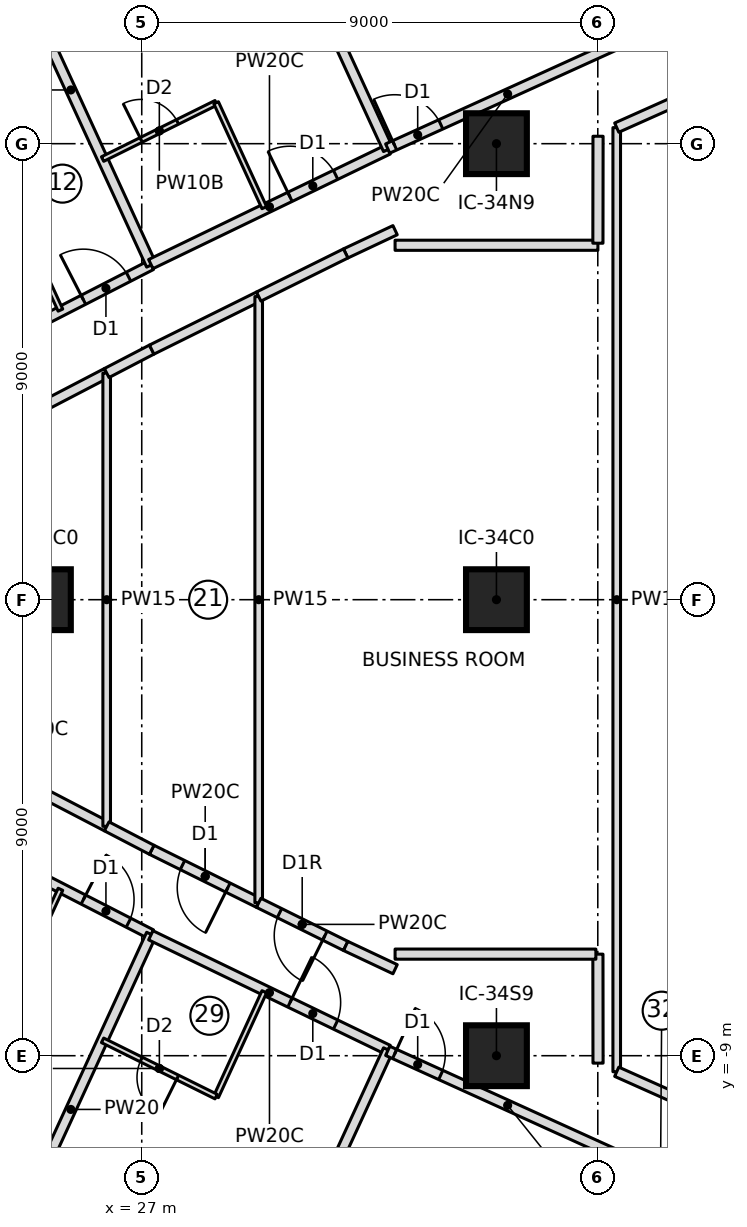
"""IFC4 building model, lengths in metres.
Left out: names, types, materials, properties, quantities, classifications, styles, units other than length and angle.
Written with IfcOpenShell. Run it as: python <this file> out.ifc"""

import sys

from ifc_helpers import new_model, si_unit, direction, frame, frame_2d, origin, origin_2d, place, context, subcontext, project, spatial, rectangle, extrude, element, fill, save


model = new_model("IFC4")
c1 = context("Model", 3, precision=1e-05, world=origin(), true_north=direction((0.0, 1.0)))
c2 = subcontext(c1, "Body", "Model", "MODEL_VIEW")
j1 = project(units=[si_unit("LENGTHUNIT", "METRE"), si_unit("PLANEANGLEUNIT", "RADIAN")], contexts=[c1])
p1 = place(None, origin())
s1 = spatial("IfcSite", under=j1, at=p1, CompositionType="ELEMENT")
p2 = place(p1, origin())
s2 = spatial("IfcBuilding", under=s1, at=p2, CompositionType="ELEMENT")
p3 = place(p2, frame((0.0, 0.0, 116.85)))
s3 = spatial("IfcBuildingStorey", under=s2, at=p3, CompositionType="ELEMENT", Elevation=116.85)
for number, where, z_axis, x_axis in (
    (1, (25.0, 0.0, 0.0), (0.0, 0.0, 1.0), (1.0, 0.0, 0.0)),
    (2, (34.0, -9.0, 0.0), (0.0, 0.0, 1.0), (1.0, 0.0, 0.0)),
    (3, (34.0, 0.0, 0.0), (0.0, 0.0, 1.0), (1.0, 0.0, 0.0)),
    (4, (34.0, 9.0, 0.0), (0.0, 0.0, 1.0), (1.0, 0.0, 0.0)),
):
    element("IfcColumn", number, at=place(p3, frame(where, z_axis=z_axis, x_axis=x_axis)), inside=s3, PredefinedType="COLUMN", context=c2, shape_type="SweptSolid", body=[
        extrude(rectangle(XDim=1.2, YDim=1.2, at=origin_2d()), origin(), (0.0, 0.0, 1.0), 3.55),
    ])
p4 = place(p3, frame((22.557, 4.229, 0.0), z_axis=(0.0, 0.0, 1.0), x_axis=(0.889706581948, 0.456532800617, 0.0)))
e5 = element("IfcWall", 5, at=p4, inside=s3, PredefinedType="PARTITIONING", context=c2, shape_type="SweptSolid", body=[
    extrude(rectangle(XDim=5.205, YDim=0.2, at=frame_2d((2.603, 0.0))), origin(), (0.0, 0.0, 1.0), 3.15),
])
p5 = place(p4, frame((3.7, 0.0, 0.0)))
e6 = element("IfcOpeningElement", 6, at=p5, cuts=e5, PredefinedType="OPENING", context=c2, shape_type="SweptSolid", body=[
    extrude(rectangle(XDim=1.0, YDim=2.1, at=frame_2d((0.5, 1.05))), frame((0.0, 0.11, 0.0), z_axis=(0.0, -1.0, 0.0), x_axis=(1.0, 0.0, 0.0)), (0.0, 0.0, 1.0), 0.22),
])
p6 = place(p3, frame((24.235, 8.242, 0.0), z_axis=(0.0, 0.0, 1.0), x_axis=(0.417359077977, -0.908741657475, 0.0)))
e7 = element("IfcWall", 7, at=p6, inside=s3, PredefinedType="PARTITIONING", context=c2, shape_type="SweptSolid", body=[
    extrude(rectangle(XDim=2.78, YDim=0.1, at=frame_2d((1.39, 0.0))), origin(), (0.0, 0.0, 1.0), 3.15),
])
p7 = place(p3, frame((27.188, 6.606, 0.0), z_axis=(0.0, 0.0, 1.0), x_axis=(-0.417428513692, 0.908709764422, 0.0)))
e8 = element("IfcWall", 8, at=p7, inside=s3, PredefinedType="PARTITIONING", context=c2, shape_type="SweptSolid", body=[
    extrude(rectangle(XDim=7.603, YDim=0.2, at=frame_2d((3.802, 0.0))), origin(), (0.0, 0.0, 1.0), 3.15),
])
p8 = place(p3, frame((27.179, 6.624, 0.0), z_axis=(0.0, 0.0, 1.0), x_axis=(0.900446408639, 0.434966970204, 0.0)))
e9 = element("IfcWall", 9, at=p8, inside=s3, PredefinedType="PARTITIONING", context=c2, shape_type="SweptSolid", body=[
    extrude(rectangle(XDim=5.201, YDim=0.2, at=frame_2d((2.601, 0.0))), origin(), (0.0, 0.0, 1.0), 3.15),
])
p9 = place(p8, frame((3.05, 0.0, 0.0)))
e10 = element("IfcOpeningElement", 10, at=p9, cuts=e9, PredefinedType="OPENING", context=c2, shape_type="SweptSolid", body=[
    extrude(rectangle(XDim=1.0, YDim=2.1, at=frame_2d((0.5, 1.05))), frame((0.0, 0.11, 0.0), z_axis=(0.0, -1.0, 0.0), x_axis=(1.0, 0.0, 0.0)), (0.0, 0.0, 1.0), 0.22),
])
p10 = place(p3, frame((26.227, 8.697, 0.0), z_axis=(0.0, 0.0, 1.0), x_axis=(0.895944857815, 0.444165297784, 0.0)))
e11 = element("IfcWall", 11, at=p10, inside=s3, PredefinedType="PARTITIONING", context=c2, shape_type="SweptSolid", body=[
    extrude(rectangle(XDim=2.501, YDim=0.1, at=frame_2d((1.25, 0.0))), origin(), (0.0, 0.0, 1.0), 3.15),
])
p11 = place(p10, frame((0.85, 0.0, 0.0)))
e12 = element("IfcOpeningElement", 12, at=p11, cuts=e11, PredefinedType="OPENING", context=c2, shape_type="SweptSolid", body=[
    extrude(rectangle(XDim=0.8, YDim=2.1, at=frame_2d((0.4, 1.05))), frame((0.0, 0.06, 0.0), z_axis=(0.0, -1.0, 0.0), x_axis=(1.0, 0.0, 0.0)), (0.0, 0.0, 1.0), 0.12),
])
p12 = place(p3, frame((28.468, 9.807, 0.0), z_axis=(0.0, 0.0, 1.0), x_axis=(0.417344701557, -0.908748260016, 0.0)))
e13 = element("IfcWall", 13, at=p12, inside=s3, PredefinedType="PARTITIONING", context=c2, shape_type="SweptSolid", body=[
    extrude(rectangle(XDim=2.278, YDim=0.1, at=frame_2d((1.139, 0.0))), origin(), (0.0, 0.0, 1.0), 3.15),
])
p13 = place(p3, frame((31.862, 8.886, 0.0), z_axis=(0.0, 0.0, 1.0), x_axis=(-0.417429919618, 0.90870911859, 0.0)))
e14 = element("IfcWall", 14, at=p13, inside=s3, PredefinedType="PARTITIONING", context=c2, shape_type="SweptSolid", body=[
    extrude(rectangle(XDim=7.6, YDim=0.2, at=frame_2d((3.8, 0.0))), origin(), (0.0, 0.0, 1.0), 3.15),
])
p14 = place(p3, frame((31.854, 8.904, 0.0), z_axis=(0.0, 0.0, 1.0), x_axis=(0.910421138148, 0.413682669704, 0.0)))
e15 = element("IfcWall", 15, at=p14, inside=s3, PredefinedType="PARTITIONING", context=c2, shape_type="SweptSolid", body=[
    extrude(rectangle(XDim=5.2, YDim=0.2, at=frame_2d((2.6, 0.0))), origin(), (0.0, 0.0, 1.0), 3.15),
])
p15 = place(p14, frame((0.15, 0.0, 0.0)))
e16 = element("IfcOpeningElement", 16, at=p15, cuts=e15, PredefinedType="OPENING", context=c2, shape_type="SweptSolid", body=[
    extrude(rectangle(XDim=1.0, YDim=2.1, at=frame_2d((0.5, 1.05))), frame((0.0, 0.11, 0.0), z_axis=(0.0, -1.0, 0.0), x_axis=(1.0, 0.0, 0.0)), (0.0, 0.0, 1.0), 0.22),
])
p16 = place(p3, frame((22.557, -4.229, 0.0), z_axis=(0.0, 0.0, 1.0), x_axis=(0.889706581948, -0.456532800617, 0.0)))
e17 = element("IfcWall", 17, at=p16, inside=s3, PredefinedType="PARTITIONING", context=c2, shape_type="SweptSolid", body=[
    extrude(rectangle(XDim=5.205, YDim=0.2, at=frame_2d((2.603, 0.0))), origin(), (0.0, 0.0, 1.0), 3.15),
])
p17 = place(p16, frame((3.7, 0.0, 0.0)))
e18 = element("IfcOpeningElement", 18, at=p17, cuts=e17, PredefinedType="OPENING", context=c2, shape_type="SweptSolid", body=[
    extrude(rectangle(XDim=1.0, YDim=2.1, at=frame_2d((0.5, 1.05))), frame((0.0, 0.11, 0.0), z_axis=(0.0, -1.0, 0.0), x_axis=(1.0, 0.0, 0.0)), (0.0, 0.0, 1.0), 0.22),
])
p18 = place(p3, frame((25.396, -5.715, 0.0), z_axis=(0.0, 0.0, 1.0), x_axis=(-0.417359077977, -0.908741657475, 0.0)))
e19 = element("IfcWall", 19, at=p18, inside=s3, PredefinedType="PARTITIONING", context=c2, shape_type="SweptSolid", body=[
    extrude(rectangle(XDim=2.78, YDim=0.1, at=frame_2d((1.39, 0.0))), origin(), (0.0, 0.0, 1.0), 3.15),
])
p19 = place(p3, frame((24.014, -13.515, 0.0), z_axis=(0.0, 0.0, 1.0), x_axis=(0.417428513692, 0.908709764422, 0.0)))
e20 = element("IfcWall", 20, at=p19, inside=s3, PredefinedType="PARTITIONING", context=c2, shape_type="SweptSolid", body=[
    extrude(rectangle(XDim=7.603, YDim=0.2, at=frame_2d((3.802, 0.0))), origin(), (0.0, 0.0, 1.0), 3.15),
])
p20 = place(p3, frame((27.179, -6.624, 0.0), z_axis=(0.0, 0.0, 1.0), x_axis=(0.900446408639, -0.434966970204, 0.0)))
e21 = element("IfcWall", 21, at=p20, inside=s3, PredefinedType="PARTITIONING", context=c2, shape_type="SweptSolid", body=[
    extrude(rectangle(XDim=5.201, YDim=0.2, at=frame_2d((2.601, 0.0))), origin(), (0.0, 0.0, 1.0), 3.15),
])
p21 = place(p20, frame((3.05, 0.0, 0.0)))
e22 = element("IfcOpeningElement", 22, at=p21, cuts=e21, PredefinedType="OPENING", context=c2, shape_type="SweptSolid", body=[
    extrude(rectangle(XDim=1.0, YDim=2.1, at=frame_2d((0.5, 1.05))), frame((0.0, 0.11, 0.0), z_axis=(0.0, -1.0, 0.0), x_axis=(1.0, 0.0, 0.0)), (0.0, 0.0, 1.0), 0.22),
])
p22 = place(p3, frame((29.419, -7.737, 0.0), z_axis=(0.0, 0.0, 1.0), x_axis=(-0.417344701557, -0.908748260016, 0.0)))
e23 = element("IfcWall", 23, at=p22, inside=s3, PredefinedType="PARTITIONING", context=c2, shape_type="SweptSolid", body=[
    extrude(rectangle(XDim=2.278, YDim=0.1, at=frame_2d((1.139, 0.0))), origin(), (0.0, 0.0, 1.0), 3.15),
])
p23 = place(p3, frame((28.468, -9.807, 0.0), z_axis=(0.0, 0.0, 1.0), x_axis=(-0.895944857815, 0.444165297784, 0.0)))
e24 = element("IfcWall", 24, at=p23, inside=s3, PredefinedType="PARTITIONING", context=c2, shape_type="SweptSolid", body=[
    extrude(rectangle(XDim=2.501, YDim=0.1, at=frame_2d((1.25, 0.0))), origin(), (0.0, 0.0, 1.0), 3.15),
])
p24 = place(p23, frame((0.85, 0.0, 0.0)))
e25 = element("IfcOpeningElement", 25, at=p24, cuts=e24, PredefinedType="OPENING", context=c2, shape_type="SweptSolid", body=[
    extrude(rectangle(XDim=0.8, YDim=2.1, at=frame_2d((0.4, 1.05))), frame((0.0, 0.06, 0.0), z_axis=(0.0, -1.0, 0.0), x_axis=(1.0, 0.0, 0.0)), (0.0, 0.0, 1.0), 0.12),
])
p25 = place(p3, frame((28.69, -15.792, 0.0), z_axis=(0.0, 0.0, 1.0), x_axis=(0.417429919618, 0.90870911859, 0.0)))
e26 = element("IfcWall", 26, at=p25, inside=s3, PredefinedType="PARTITIONING", context=c2, shape_type="SweptSolid", body=[
    extrude(rectangle(XDim=7.6, YDim=0.2, at=frame_2d((3.8, 0.0))), origin(), (0.0, 0.0, 1.0), 3.15),
])
p26 = place(p3, frame((31.854, -8.904, 0.0), z_axis=(0.0, 0.0, 1.0), x_axis=(0.910421138148, -0.413682669704, 0.0)))
e27 = element("IfcWall", 27, at=p26, inside=s3, PredefinedType="PARTITIONING", context=c2, shape_type="SweptSolid", body=[
    extrude(rectangle(XDim=5.2, YDim=0.2, at=frame_2d((2.6, 0.0))), origin(), (0.0, 0.0, 1.0), 3.15),
])
p27 = place(p26, frame((0.15, 0.0, 0.0)))
e28 = element("IfcOpeningElement", 28, at=p27, cuts=e27, PredefinedType="OPENING", context=c2, shape_type="SweptSolid", body=[
    extrude(rectangle(XDim=1.0, YDim=2.1, at=frame_2d((0.5, 1.05))), frame((0.0, 0.11, 0.0), z_axis=(0.0, -1.0, 0.0), x_axis=(1.0, 0.0, 0.0)), (0.0, 0.0, 1.0), 0.22),
])
for number, where, z_axis, x_axis in (
    (29, (23.407, 2.962, 0.0), (0.0, 0.0, 1.0), (0.887, 0.462, 0.0)),
    (30, (26.308, -4.473, 0.0), (0.0, 0.0, 1.0), (-0.887, 0.462, 0.0)),
):
    element("IfcWall", number, at=place(p3, frame(where, z_axis=z_axis, x_axis=x_axis)), inside=s3, PredefinedType="PARTITIONING", context=c2, shape_type="SweptSolid", body=[
        extrude(rectangle(XDim=3.271, YDim=0.2, at=frame_2d((1.636, 0.0))), origin(), (0.0, 0.0, 1.0), 3.15),
    ])
p28 = place(p3, frame((26.308, -4.473, 0.0), z_axis=(0.0, 0.0, 1.0), x_axis=(0.0, 1.0, 0.0)))
e31 = element("IfcWall", 31, at=p28, inside=s3, PredefinedType="PARTITIONING", context=c2, shape_type="SweptSolid", body=[
    extrude(rectangle(XDim=8.946, YDim=0.15, at=frame_2d((4.473, 0.0))), origin(), (0.0, 0.0, 1.0), 3.15),
])
p29 = place(p3, frame((29.308, -5.983, 0.0), z_axis=(0.0, 0.0, 1.0), x_axis=(-0.895954899574, 0.444145041546, 0.0)))
e32 = element("IfcWall", 32, at=p29, inside=s3, PredefinedType="PARTITIONING", context=c2, shape_type="SweptSolid", body=[
    extrude(rectangle(XDim=2.357, YDim=0.2, at=frame_2d((1.179, 0.0))), origin(), (0.0, 0.0, 1.0), 3.15),
])
p30 = place(p29, frame((0.678, 0.0, 0.0)))
e33 = element("IfcOpeningElement", 33, at=p30, cuts=e32, PredefinedType="OPENING", context=c2, shape_type="SweptSolid", body=[
    extrude(rectangle(XDim=1.0, YDim=2.1, at=frame_2d((0.5, 1.05))), frame((0.0, 0.11, 0.0), z_axis=(0.0, -1.0, 0.0), x_axis=(1.0, 0.0, 0.0)), (0.0, 0.0, 1.0), 0.22),
])
for number, where, z_axis, x_axis in (
    (34, (27.196, -4.936, 0.0), (0.0, 0.0, 1.0), (-0.887, 0.462, 0.0)),
    (35, (26.308, 4.473, 0.0), (0.0, 0.0, 1.0), (0.887, 0.462, 0.0)),
):
    element("IfcWall", number, at=place(p3, frame(where, z_axis=z_axis, x_axis=x_axis)), inside=s3, PredefinedType="PARTITIONING", context=c2, shape_type="SweptSolid", body=[
        extrude(rectangle(XDim=1.001, YDim=0.2, at=frame_2d((0.501, 0.0))), origin(), (0.0, 0.0, 1.0), 3.15),
    ])
p31 = place(p3, frame((27.196, 4.936, 0.0), z_axis=(0.0, 0.0, 1.0), x_axis=(0.895954899574, 0.444145041546, 0.0)))
e36 = element("IfcWall", 36, at=p31, inside=s3, PredefinedType="PARTITIONING", context=c2, shape_type="SweptSolid", body=[
    extrude(rectangle(XDim=2.357, YDim=0.2, at=frame_2d((1.179, 0.0))), origin(), (0.0, 0.0, 1.0), 3.15),
])
p32 = place(p3, frame((29.308, -5.983, 0.0), z_axis=(0.0, 0.0, 1.0), x_axis=(0.0, 1.0, 0.0)))
e37 = element("IfcWall", 37, at=p32, inside=s3, PredefinedType="PARTITIONING", context=c2, shape_type="SweptSolid", body=[
    extrude(rectangle(XDim=11.965, YDim=0.15, at=frame_2d((5.983, 0.0))), origin(), (0.0, 0.0, 1.0), 3.15),
])
p33 = place(p3, frame((31.025, -6.833, 0.0), z_axis=(0.0, 0.0, 1.0), x_axis=(-0.896001589052, 0.444050844404, 0.0)))
e38 = element("IfcWall", 38, at=p33, inside=s3, PredefinedType="PARTITIONING", context=c2, shape_type="SweptSolid", body=[
    extrude(rectangle(XDim=1.916, YDim=0.2, at=frame_2d((0.958, 0.0))), origin(), (0.0, 0.0, 1.0), 3.15),
])
p34 = place(p33, frame((0.458, 0.0, 0.0)))
e39 = element("IfcOpeningElement", 39, at=p34, cuts=e38, PredefinedType="OPENING", context=c2, shape_type="SweptSolid", body=[
    extrude(rectangle(XDim=1.0, YDim=2.1, at=frame_2d((0.5, 1.05))), frame((0.0, 0.11, 0.0), z_axis=(0.0, -1.0, 0.0), x_axis=(1.0, 0.0, 0.0)), (0.0, 0.0, 1.0), 0.22),
])
for number, where, z_axis, x_axis in (
    (40, (31.025, 6.833, 0.0), (0.0, 0.0, 1.0), (0.905, 0.426, 0.0)),
    (41, (32.0, -7.293, 0.0), (0.0, 0.0, 1.0), (-0.905, 0.426, 0.0)),
):
    element("IfcWall", number, at=place(p3, frame(where, z_axis=z_axis, x_axis=x_axis)), inside=s3, PredefinedType="PARTITIONING", context=c2, shape_type="SweptSolid", body=[
        extrude(rectangle(XDim=1.078, YDim=0.2, at=frame_2d((0.539, 0.0))), origin(), (0.0, 0.0, 1.0), 3.15),
    ])
p35 = place(p3, frame((29.308, 5.983, 0.0), z_axis=(0.0, 0.0, 1.0), x_axis=(0.896001589052, 0.444050844404, 0.0)))
e42 = element("IfcWall", 42, at=p35, inside=s3, PredefinedType="PARTITIONING", context=c2, shape_type="SweptSolid", body=[
    extrude(rectangle(XDim=1.916, YDim=0.2, at=frame_2d((0.958, 0.0))), origin(), (0.0, 0.0, 1.0), 3.15),
])
p36 = place(p3, frame((36.374, -9.317, 0.0), z_axis=(0.0, 0.0, 1.0), x_axis=(0.0, 1.0, 0.0)))
e43 = element("IfcWall", 43, at=p36, inside=s3, PredefinedType="PARTITIONING", context=c2, shape_type="SweptSolid", body=[
    extrude(rectangle(XDim=18.634, YDim=0.15, at=frame_2d((9.317, 0.0))), origin(), (0.0, 0.0, 1.0), 3.15),
])
for number, where, z_axis, x_axis in (
    (44, (38.792, -10.397, 0.0), (0.0, 0.0, 1.0), (-0.913, 0.408, 0.0)),
    (45, (36.374, 9.317, 0.0), (0.0, 0.0, 1.0), (0.913, 0.408, 0.0)),
):
    element("IfcWall", number, at=place(p3, frame(where, z_axis=z_axis, x_axis=x_axis)), inside=s3, PredefinedType="PARTITIONING", context=c2, shape_type="SweptSolid", body=[
        extrude(rectangle(XDim=2.648, YDim=0.2, at=frame_2d((1.324, 0.0))), origin(), (0.0, 0.0, 1.0), 3.15),
    ])
p37 = place(p3, frame((36.005, -9.146, 0.0), z_axis=(0.0, 0.0, 1.0), x_axis=(-0.001135073049, 0.999999355804, 0.0)))
e46 = element("IfcWall", 46, at=p37, inside=s3, PredefinedType="PARTITIONING", context=c2, shape_type="SweptSolid", body=[
    extrude(rectangle(XDim=2.151, YDim=0.2, at=frame_2d((1.075, 0.0))), origin(), (0.0, 0.0, 1.0), 3.15),
])
p38 = place(p3, frame((35.962, -6.996, 0.0), z_axis=(0.0, 0.0, 1.0), x_axis=(-0.999999992409, 0.000123213405, 0.0)))
e47 = element("IfcWall", 47, at=p38, inside=s3, PredefinedType="PARTITIONING", context=c2, shape_type="SweptSolid", body=[
    extrude(rectangle(XDim=3.963, YDim=0.2, at=frame_2d((1.981, 0.0))), origin(), (0.0, 0.0, 1.0), 3.15),
])
p39 = place(p3, frame((32.0, 6.995, 0.0), z_axis=(0.0, 0.0, 1.0), x_axis=(0.99999999256, 0.00012198097, 0.0)))
e48 = element("IfcWall", 48, at=p39, inside=s3, PredefinedType="PARTITIONING", context=c2, shape_type="SweptSolid", body=[
    extrude(rectangle(XDim=4.003, YDim=0.2, at=frame_2d((2.001, 0.0))), origin(), (0.0, 0.0, 1.0), 3.15),
])
p40 = place(p3, frame((36.002, 7.036, 0.0), z_axis=(0.0, 0.0, 1.0), x_axis=(0.001156603436, 0.999999331134, 0.0)))
e49 = element("IfcWall", 49, at=p40, inside=s3, PredefinedType="PARTITIONING", context=c2, shape_type="SweptSolid", body=[
    extrude(rectangle(XDim=2.111, YDim=0.2, at=frame_2d((1.055, 0.0))), origin(), (0.0, 0.0, 1.0), 3.15),
])
p41 = place(p5, origin())
e50 = element("IfcDoor", 50, at=p41, inside=s3, OperationType="SINGLE_SWING_LEFT", PredefinedType="DOOR", context=c2, shape_type="SweptSolid", body=[
    extrude(rectangle(XDim=1.0, YDim=2.1, at=frame_2d((0.5, 1.05))), frame((0.0, 0.025, 0.0), z_axis=(0.0, -1.0, 0.0), x_axis=(1.0, 0.0, 0.0)), (0.0, 0.0, 1.0), 0.05),
])
fill(e6, e50)
p42 = place(p11, origin())
e51 = element("IfcDoor", 51, at=p42, inside=s3, OperationType="SINGLE_SWING_LEFT", PredefinedType="DOOR", context=c2, shape_type="SweptSolid", body=[
    extrude(rectangle(XDim=0.8, YDim=2.1, at=frame_2d((0.4, 1.05))), frame((0.0, 0.025, 0.0), z_axis=(0.0, -1.0, 0.0), x_axis=(1.0, 0.0, 0.0)), (0.0, 0.0, 1.0), 0.05),
])
fill(e12, e51)
p43 = place(p9, origin())
e52 = element("IfcDoor", 52, at=p43, inside=s3, OperationType="SINGLE_SWING_LEFT", PredefinedType="DOOR", context=c2, shape_type="SweptSolid", body=[
    extrude(rectangle(XDim=1.0, YDim=2.1, at=frame_2d((0.5, 1.05))), frame((0.0, 0.025, 0.0), z_axis=(0.0, -1.0, 0.0), x_axis=(1.0, 0.0, 0.0)), (0.0, 0.0, 1.0), 0.05),
])
fill(e10, e52)
p44 = place(p15, origin())
e53 = element("IfcDoor", 53, at=p44, inside=s3, OperationType="SINGLE_SWING_LEFT", PredefinedType="DOOR", context=c2, shape_type="SweptSolid", body=[
    extrude(rectangle(XDim=1.0, YDim=2.1, at=frame_2d((0.5, 1.05))), frame((0.0, 0.025, 0.0), z_axis=(0.0, -1.0, 0.0), x_axis=(1.0, 0.0, 0.0)), (0.0, 0.0, 1.0), 0.05),
])
fill(e16, e53)
p45 = place(p17, origin())
e54 = element("IfcDoor", 54, at=p45, inside=s3, OperationType="SINGLE_SWING_LEFT", PredefinedType="DOOR", context=c2, shape_type="SweptSolid", body=[
    extrude(rectangle(XDim=1.0, YDim=2.1, at=frame_2d((0.5, 1.05))), frame((0.0, 0.025, 0.0), z_axis=(0.0, -1.0, 0.0), x_axis=(1.0, 0.0, 0.0)), (0.0, 0.0, 1.0), 0.05),
])
fill(e18, e54)
p46 = place(p24, origin())
e55 = element("IfcDoor", 55, at=p46, inside=s3, OperationType="SINGLE_SWING_LEFT", PredefinedType="DOOR", context=c2, shape_type="SweptSolid", body=[
    extrude(rectangle(XDim=0.8, YDim=2.1, at=frame_2d((0.4, 1.05))), frame((0.0, 0.025, 0.0), z_axis=(0.0, -1.0, 0.0), x_axis=(1.0, 0.0, 0.0)), (0.0, 0.0, 1.0), 0.05),
])
fill(e25, e55)
p47 = place(p21, origin())
e56 = element("IfcDoor", 56, at=p47, inside=s3, OperationType="SINGLE_SWING_LEFT", PredefinedType="DOOR", context=c2, shape_type="SweptSolid", body=[
    extrude(rectangle(XDim=1.0, YDim=2.1, at=frame_2d((0.5, 1.05))), frame((0.0, 0.025, 0.0), z_axis=(0.0, -1.0, 0.0), x_axis=(1.0, 0.0, 0.0)), (0.0, 0.0, 1.0), 0.05),
])
fill(e22, e56)
p48 = place(p27, origin())
e57 = element("IfcDoor", 57, at=p48, inside=s3, OperationType="SINGLE_SWING_LEFT", PredefinedType="DOOR", context=c2, shape_type="SweptSolid", body=[
    extrude(rectangle(XDim=1.0, YDim=2.1, at=frame_2d((0.5, 1.05))), frame((0.0, 0.025, 0.0), z_axis=(0.0, -1.0, 0.0), x_axis=(1.0, 0.0, 0.0)), (0.0, 0.0, 1.0), 0.05),
])
fill(e28, e57)
p49 = place(p30, origin())
e58 = element("IfcDoor", 58, at=p49, inside=s3, OperationType="SINGLE_SWING_LEFT", PredefinedType="DOOR", context=c2, shape_type="SweptSolid", body=[
    extrude(rectangle(XDim=1.0, YDim=2.1, at=frame_2d((0.5, 1.05))), frame((0.0, 0.025, 0.0), z_axis=(0.0, -1.0, 0.0), x_axis=(1.0, 0.0, 0.0)), (0.0, 0.0, 1.0), 0.05),
])
fill(e33, e58)
p50 = place(p34, origin())
e59 = element("IfcDoor", 59, at=p50, inside=s3, OperationType="SINGLE_SWING_RIGHT", PredefinedType="DOOR", context=c2, shape_type="SweptSolid", body=[
    extrude(rectangle(XDim=1.0, YDim=2.1, at=frame_2d((0.5, 1.05))), frame((0.0, 0.025, 0.0), z_axis=(0.0, -1.0, 0.0), x_axis=(1.0, 0.0, 0.0)), (0.0, 0.0, 1.0), 0.05),
])
fill(e39, e59)
save(model, sys.argv[1])
